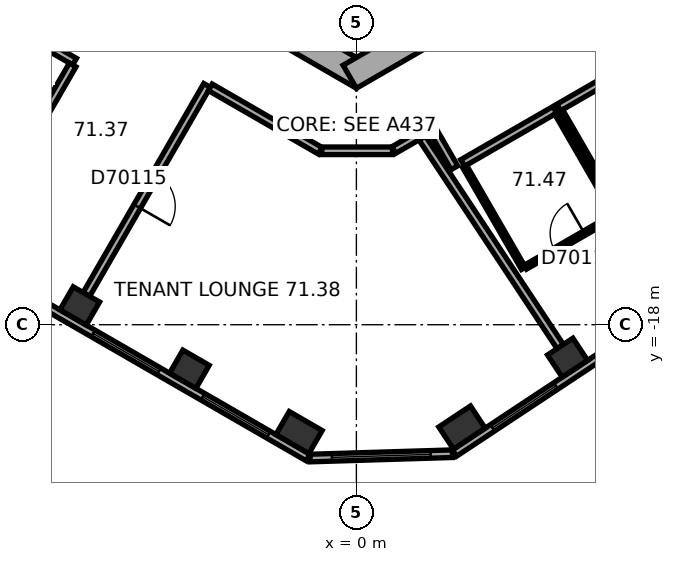
"""IFC4 building model, lengths in metres.
Left out: names, types, materials, properties, quantities, classifications, styles, units other than length and angle.
Written with IfcOpenShell. Run it as: python <this file> out.ifc"""

import sys

from ifc_helpers import new_model, si_unit, direction, frame, frame_2d, origin, origin_2d, place, context, subcontext, project, spatial, rectangle, extrude, element, fill, save


model = new_model("IFC4")
c1 = context("Model", 3, precision=1e-05, world=origin(), true_north=direction((0.0, 1.0)))
c2 = subcontext(c1, "Body", "Model", "MODEL_VIEW")
j1 = project(units=[si_unit("LENGTHUNIT", "METRE"), si_unit("PLANEANGLEUNIT", "RADIAN")], contexts=[c1])
p1 = place(None, origin())
s1 = spatial("IfcSite", under=j1, at=p1, CompositionType="ELEMENT")
p2 = place(p1, origin())
s2 = spatial("IfcBuilding", under=s1, at=p2, CompositionType="ELEMENT")
p3 = place(p2, frame((0.0, 0.0, 289.4)))
s3 = spatial("IfcBuildingStorey", under=s2, at=p3, CompositionType="ELEMENT", Elevation=289.4)
for number, where, z_axis, x_axis in (
    (1, (-7.28, -17.505, 0.0), (0.0, 0.0, 1.0), (0.866, -0.5, 0.0)),
    (2, (-4.395, -19.171, 0.0), (0.0, 0.0, 1.0), (0.866, -0.5, 0.0)),
):
    element("IfcColumn", number, at=place(p3, frame(where, z_axis=z_axis, x_axis=x_axis)), inside=s3, PredefinedType="COLUMN", context=c2, shape_type="SweptSolid", body=[
        extrude(rectangle(XDim=0.8, YDim=0.7, at=origin_2d()), origin(), (0.0, 0.0, 1.0), 3.7),
    ])
for number, where, z_axis, x_axis in (
    (3, (-1.509, -20.837, 0.0), (0.0, 0.0, 1.0), (0.866, -0.5, 0.0)),
    (4, (2.778, -20.706, 0.0), (0.0, 0.0, 1.0), (0.834, 0.552, 0.0)),
):
    element("IfcColumn", number, at=place(p3, frame(where, z_axis=z_axis, x_axis=x_axis)), inside=s3, PredefinedType="COLUMN", context=c2, shape_type="SweptSolid", body=[
        extrude(rectangle(XDim=1.0, YDim=0.7, at=origin_2d()), origin(), (0.0, 0.0, 1.0), 3.7),
    ])
p4 = place(p3, frame((5.557, -18.867, 0.0), z_axis=(0.0, 0.0, 1.0), x_axis=(0.833885822067, 0.551936985312, 0.0)))
e5 = element("IfcColumn", 5, at=p4, inside=s3, PredefinedType="COLUMN", context=c2, shape_type="SweptSolid", body=[
    extrude(rectangle(XDim=0.8, YDim=0.7, at=origin_2d()), origin(), (0.0, 0.0, 1.0), 3.7),
])
p5 = place(p3, frame((-10.025, -5.586, 0.0), z_axis=(0.0, 0.0, 1.0), x_axis=(0.866026453023, -0.499998182661, 0.0)))
e6 = element("IfcWall", 6, at=p5, inside=s3, PredefinedType="SHEAR", context=c2, shape_type="SweptSolid", body=[
    extrude(rectangle(XDim=11.778, YDim=0.7, at=frame_2d((5.889, 0.0))), origin(), (0.0, 0.0, 1.0), 3.7),
])
p6 = place(p5, frame((6.089, 0.0, 0.0)))
e7 = element("IfcOpeningElement", 7, at=p6, cuts=e6, PredefinedType="OPENING", context=c2, shape_type="SweptSolid", body=[
    extrude(rectangle(XDim=1.5, YDim=2.1, at=frame_2d((0.75, 1.05))), frame((0.0, 0.36, 0.0), z_axis=(0.0, -1.0, 0.0), x_axis=(1.0, 0.0, 0.0)), (0.0, 0.0, 1.0), 0.72),
])
p7 = place(p5, frame((1.539, 0.0, 0.0)))
e8 = element("IfcOpeningElement", 8, at=p7, cuts=e6, PredefinedType="OPENING", context=c2, shape_type="SweptSolid", body=[
    extrude(rectangle(XDim=1.1, YDim=2.1, at=frame_2d((0.55, 1.05))), frame((0.0, 0.36, 0.0), z_axis=(0.0, -1.0, 0.0), x_axis=(1.0, 0.0, 0.0)), (0.0, 0.0, 1.0), 0.72),
])
p8 = place(p5, frame((4.139, 0.0, 0.0)))
e9 = element("IfcOpeningElement", 9, at=p8, cuts=e6, PredefinedType="OPENING", context=c2, shape_type="SweptSolid", body=[
    extrude(rectangle(XDim=1.1, YDim=2.1, at=frame_2d((0.55, 1.05))), frame((0.0, 0.36, 0.0), z_axis=(0.0, -1.0, 0.0), x_axis=(1.0, 0.0, 0.0)), (0.0, 0.0, 1.0), 0.72),
])
p9 = place(p3, frame((-0.175, -11.475, 0.0), z_axis=(0.0, 0.0, 1.0), x_axis=(0.866026453023, 0.499998182661, 0.0)))
e10 = element("IfcWall", 10, at=p9, inside=s3, PredefinedType="SHEAR", context=c2, shape_type="SweptSolid", body=[
    extrude(rectangle(XDim=11.778, YDim=0.7, at=frame_2d((5.889, 0.0))), origin(), (0.0, 0.0, 1.0), 3.7),
])
p10 = place(p9, frame((2.439, 0.0, 0.0)))
e11 = element("IfcOpeningElement", 11, at=p10, cuts=e10, PredefinedType="OPENING", context=c2, shape_type="SweptSolid", body=[
    extrude(rectangle(XDim=1.1, YDim=2.1, at=frame_2d((0.55, 1.05))), frame((0.0, 0.36, 0.0), z_axis=(0.0, -1.0, 0.0), x_axis=(1.0, 0.0, 0.0)), (0.0, 0.0, 1.0), 0.72),
])
p11 = place(p9, frame((5.039, 0.0, 0.0)))
e12 = element("IfcOpeningElement", 12, at=p11, cuts=e10, PredefinedType="OPENING", context=c2, shape_type="SweptSolid", body=[
    extrude(rectangle(XDim=1.1, YDim=2.1, at=frame_2d((0.55, 1.05))), frame((0.0, 0.36, 0.0), z_axis=(0.0, -1.0, 0.0), x_axis=(1.0, 0.0, 0.0)), (0.0, 0.0, 1.0), 0.72),
])
p12 = place(p9, frame((7.639, 0.0, 0.0)))
e13 = element("IfcOpeningElement", 13, at=p12, cuts=e10, PredefinedType="OPENING", context=c2, shape_type="SweptSolid", body=[
    extrude(rectangle(XDim=1.1, YDim=2.1, at=frame_2d((0.55, 1.05))), frame((0.0, 0.36, 0.0), z_axis=(0.0, -1.0, 0.0), x_axis=(1.0, 0.0, 0.0)), (0.0, 0.0, 1.0), 0.72),
])
p13 = place(p3, frame((-16.626, -12.629, 0.0), z_axis=(0.0, 0.0, 1.0), x_axis=(0.866026460444, -0.499998169808, 0.0)))
e14 = element("IfcWall", 14, at=p13, inside=s3, PredefinedType="STANDARD", context=c2, shape_type="SweptSolid", body=[
    extrude(rectangle(XDim=17.731, YDim=0.2, at=frame_2d((8.866, 0.0))), origin(), (0.0, 0.0, 1.0), 3.7),
])
p14 = place(p13, frame((1.203, 0.0, 0.9)))
e15 = element("IfcOpeningElement", 15, at=p14, cuts=e14, PredefinedType="OPENING", context=c2, shape_type="SweptSolid", body=[
    extrude(rectangle(XDim=2.0, YDim=2.0, at=frame_2d((1.0, 1.0))), frame((0.0, 0.11, 0.0), z_axis=(0.0, -1.0, 0.0), x_axis=(1.0, 0.0, 0.0)), (0.0, 0.0, 1.0), 0.22),
])
p15 = place(p13, frame((4.535, 0.0, 0.9)))
e16 = element("IfcOpeningElement", 16, at=p15, cuts=e14, PredefinedType="OPENING", context=c2, shape_type="SweptSolid", body=[
    extrude(rectangle(XDim=2.0, YDim=2.0, at=frame_2d((1.0, 1.0))), frame((0.0, 0.11, 0.0), z_axis=(0.0, -1.0, 0.0), x_axis=(1.0, 0.0, 0.0)), (0.0, 0.0, 1.0), 0.22),
])
p16 = place(p13, frame((7.867, 0.0, 0.9)))
e17 = element("IfcOpeningElement", 17, at=p16, cuts=e14, PredefinedType="OPENING", context=c2, shape_type="SweptSolid", body=[
    extrude(rectangle(XDim=2.0, YDim=2.0, at=frame_2d((1.0, 1.0))), frame((0.0, 0.11, 0.0), z_axis=(0.0, -1.0, 0.0), x_axis=(1.0, 0.0, 0.0)), (0.0, 0.0, 1.0), 0.22),
])
p17 = place(p13, frame((11.198, 0.0, 0.9)))
e18 = element("IfcOpeningElement", 18, at=p17, cuts=e14, PredefinedType="OPENING", context=c2, shape_type="SweptSolid", body=[
    extrude(rectangle(XDim=2.0, YDim=2.0, at=frame_2d((1.0, 1.0))), frame((0.0, 0.11, 0.0), z_axis=(0.0, -1.0, 0.0), x_axis=(1.0, 0.0, 0.0)), (0.0, 0.0, 1.0), 0.22),
])
p18 = place(p13, frame((14.53, 0.0, 0.9)))
e19 = element("IfcOpeningElement", 19, at=p18, cuts=e14, PredefinedType="OPENING", context=c2, shape_type="SweptSolid", body=[
    extrude(rectangle(XDim=2.0, YDim=2.0, at=frame_2d((1.0, 1.0))), frame((0.0, 0.11, 0.0), z_axis=(0.0, -1.0, 0.0), x_axis=(1.0, 0.0, 0.0)), (0.0, 0.0, 1.0), 0.22),
])
p19 = place(p3, frame((-1.217, -21.508, 0.0), z_axis=(0.0, 0.0, 1.0), x_axis=(0.99953295295, 0.030559384285, 0.0)))
e20 = element("IfcWall", 20, at=p19, inside=s3, PredefinedType="STANDARD", context=c2, shape_type="SweptSolid", body=[
    extrude(rectangle(XDim=3.747, YDim=0.2, at=frame_2d((1.874, 0.0))), origin(), (0.0, 0.0, 1.0), 3.7),
])
p20 = place(p19, frame((0.573, 0.0, 0.9)))
e21 = element("IfcOpeningElement", 21, at=p20, cuts=e20, PredefinedType="OPENING", context=c2, shape_type="SweptSolid", body=[
    extrude(rectangle(XDim=2.6, YDim=2.0, at=frame_2d((1.3, 1.0))), frame((0.0, 0.11, 0.0), z_axis=(0.0, -1.0, 0.0), x_axis=(1.0, 0.0, 0.0)), (0.0, 0.0, 1.0), 0.22),
])
p21 = place(p3, frame((2.58, -21.377, 0.0), z_axis=(0.0, 0.0, 1.0), x_axis=(0.833888592176, 0.551932800112, 0.0)))
e22 = element("IfcWall", 22, at=p21, inside=s3, PredefinedType="STANDARD", context=c2, shape_type="SweptSolid", body=[
    extrude(rectangle(XDim=17.731, YDim=0.2, at=frame_2d((8.866, 0.0))), origin(), (0.0, 0.0, 1.0), 3.7),
])
p22 = place(p21, frame((1.202, 0.0, 0.9)))
e23 = element("IfcOpeningElement", 23, at=p22, cuts=e22, PredefinedType="OPENING", context=c2, shape_type="SweptSolid", body=[
    extrude(rectangle(XDim=2.0, YDim=2.0, at=frame_2d((1.0, 1.0))), frame((0.0, 0.11, 0.0), z_axis=(0.0, -1.0, 0.0), x_axis=(1.0, 0.0, 0.0)), (0.0, 0.0, 1.0), 0.22),
])
p23 = place(p21, frame((4.533, 0.0, 0.9)))
e24 = element("IfcOpeningElement", 24, at=p23, cuts=e22, PredefinedType="OPENING", context=c2, shape_type="SweptSolid", body=[
    extrude(rectangle(XDim=2.0, YDim=2.0, at=frame_2d((1.0, 1.0))), frame((0.0, 0.11, 0.0), z_axis=(0.0, -1.0, 0.0), x_axis=(1.0, 0.0, 0.0)), (0.0, 0.0, 1.0), 0.22),
])
p24 = place(p21, frame((7.865, 0.0, 0.9)))
e25 = element("IfcOpeningElement", 25, at=p24, cuts=e22, PredefinedType="OPENING", context=c2, shape_type="SweptSolid", body=[
    extrude(rectangle(XDim=2.0, YDim=2.0, at=frame_2d((1.0, 1.0))), frame((0.0, 0.11, 0.0), z_axis=(0.0, -1.0, 0.0), x_axis=(1.0, 0.0, 0.0)), (0.0, 0.0, 1.0), 0.22),
])
p25 = place(p21, frame((11.197, 0.0, 0.9)))
e26 = element("IfcOpeningElement", 26, at=p25, cuts=e22, PredefinedType="OPENING", context=c2, shape_type="SweptSolid", body=[
    extrude(rectangle(XDim=2.0, YDim=2.0, at=frame_2d((1.0, 1.0))), frame((0.0, 0.11, 0.0), z_axis=(0.0, -1.0, 0.0), x_axis=(1.0, 0.0, 0.0)), (0.0, 0.0, 1.0), 0.22),
])
p26 = place(p21, frame((14.528, 0.0, 0.9)))
e27 = element("IfcOpeningElement", 27, at=p26, cuts=e22, PredefinedType="OPENING", context=c2, shape_type="SweptSolid", body=[
    extrude(rectangle(XDim=2.0, YDim=2.0, at=frame_2d((1.0, 1.0))), frame((0.0, 0.11, 0.0), z_axis=(0.0, -1.0, 0.0), x_axis=(1.0, 0.0, 0.0)), (0.0, 0.0, 1.0), 0.22),
])
p27 = place(p3, frame((-11.285, -8.844, 0.0), z_axis=(0.0, 0.0, 1.0), x_axis=(0.866021785011, -0.500006267848, 0.0)))
e28 = element("IfcWall", 28, at=p27, inside=s3, PredefinedType="PARTITIONING", context=c2, shape_type="SweptSolid", body=[
    extrude(rectangle(XDim=4.468, YDim=0.2, at=frame_2d((2.234, 0.0))), origin(), (0.0, 0.0, 1.0), 3.42),
])
p28 = place(p3, frame((-9.99, -15.537, 0.0), z_axis=(0.0, 0.0, 1.0), x_axis=(0.499966611936, 0.866044679534, 0.0)))
e29 = element("IfcWall", 29, at=p28, inside=s3, PredefinedType="PARTITIONING", context=c2, shape_type="SweptSolid", body=[
    extrude(rectangle(XDim=5.049, YDim=0.2, at=frame_2d((2.524, 0.0))), origin(), (0.0, 0.0, 1.0), 2.87),
])
p29 = place(p28, frame((2.024, 0.0, 0.0)))
e30 = element("IfcOpeningElement", 30, at=p29, cuts=e29, PredefinedType="OPENING", context=c2, shape_type="SweptSolid", body=[
    extrude(rectangle(XDim=1.0, YDim=2.1, at=frame_2d((0.5, 1.05))), frame((0.0, 0.11, 0.0), z_axis=(0.0, -1.0, 0.0), x_axis=(1.0, 0.0, 0.0)), (0.0, 0.0, 1.0), 0.22),
])
p30 = place(p3, frame((-7.105, -17.202, 0.0), z_axis=(0.0, 0.0, 1.0), x_axis=(0.499988692146, 0.866031932279, 0.0)))
e31 = element("IfcWall", 31, at=p30, inside=s3, PredefinedType="PARTITIONING", context=c2, shape_type="SweptSolid", body=[
    extrude(rectangle(XDim=6.35, YDim=0.2, at=frame_2d((3.175, 0.0))), origin(), (0.0, 0.0, 1.0), 3.42),
])
p31 = place(p30, frame((2.675, 0.0, 0.0)))
e32 = element("IfcOpeningElement", 32, at=p31, cuts=e31, PredefinedType="OPENING", context=c2, shape_type="SweptSolid", body=[
    extrude(rectangle(XDim=1.0, YDim=2.1, at=frame_2d((0.5, 1.05))), frame((0.0, 0.11, 0.0), z_axis=(0.0, -1.0, 0.0), x_axis=(1.0, 0.0, 0.0)), (0.0, 0.0, 1.0), 0.22),
])
p32 = place(p3, frame((-3.843, -11.753, 0.0), z_axis=(0.0, 0.0, 1.0), x_axis=(0.866031037473, -0.499990242038, 0.0)))
e33 = element("IfcWall", 33, at=p32, inside=s3, PredefinedType="PARTITIONING", context=c2, shape_type="SweptSolid", body=[
    extrude(rectangle(XDim=3.341, YDim=0.2, at=frame_2d((1.67, 0.0))), origin(), (0.0, 0.0, 1.0), 3.42),
])
p33 = place(p3, frame((-0.91, -13.423, 0.0), z_axis=(0.0, 0.0, 1.0), x_axis=(1.0, 0.0, 0.0)))
e34 = element("IfcWall", 34, at=p33, inside=s3, PredefinedType="PARTITIONING", context=c2, shape_type="SweptSolid", body=[
    extrude(rectangle(XDim=1.86, YDim=0.2, at=frame_2d((0.93, 0.0))), origin(), (0.0, 0.0, 1.0), 3.42),
])
p34 = place(p3, frame((0.985, -13.403, 0.0), z_axis=(0.0, 0.0, 1.0), x_axis=(0.866032814021, 0.499987164874, 0.0)))
e35 = element("IfcWall", 35, at=p34, inside=s3, PredefinedType="PARTITIONING", context=c2, shape_type="SweptSolid", body=[
    extrude(rectangle(XDim=0.798, YDim=0.2, at=frame_2d((0.399, 0.0))), origin(), (0.0, 0.0, 1.0), 3.42),
])
p35 = place(p3, frame((1.979, -12.829, 0.0), z_axis=(0.0, 0.0, 1.0), x_axis=(0.500074377092, -0.865982457891, 0.0)))
e36 = element("IfcWall", 36, at=p35, inside=s3, PredefinedType="PARTITIONING", context=c2, shape_type="SweptSolid", body=[
    extrude(rectangle(XDim=1.201, YDim=0.2, at=frame_2d((0.601, 0.0))), origin(), (0.0, 0.0, 1.0), 3.42),
])
p36 = place(p3, frame((2.796, -13.744, 0.0), z_axis=(0.0, 0.0, 1.0), x_axis=(0.866034573852, 0.49998411664, 0.0)))
e37 = element("IfcWall", 37, at=p36, inside=s3, PredefinedType="PARTITIONING", context=c2, shape_type="SweptSolid", body=[
    extrude(rectangle(XDim=2.8, YDim=0.2, at=frame_2d((1.4, 0.0))), origin(), (0.0, 0.0, 1.0), 3.42),
])
p37 = place(p3, frame((4.396, -16.516, 0.0), z_axis=(0.0, 0.0, 1.0), x_axis=(-0.49999285859, 0.86602952684, 0.0)))
e38 = element("IfcWall", 38, at=p37, inside=s3, PredefinedType="PARTITIONING", context=c2, shape_type="SweptSolid", body=[
    extrude(rectangle(XDim=3.1, YDim=0.12, at=frame_2d((1.55, 0.0))), origin(), (0.0, 0.0, 1.0), 3.42),
])
p38 = place(p3, frame((5.271, -12.431, 0.0), z_axis=(0.0, 0.0, 1.0), x_axis=(0.500026960575, -0.86600983753, 0.0)))
e39 = element("IfcWall", 39, at=p38, inside=s3, PredefinedType="PARTITIONING", context=c2, shape_type="SweptSolid", body=[
    extrude(rectangle(XDim=3.1, YDim=0.12, at=frame_2d((1.55, 0.0))), origin(), (0.0, 0.0, 1.0), 3.42),
])
p39 = place(p3, frame((5.325, -12.284, 0.0), z_axis=(0.0, 0.0, 1.0), x_axis=(0.866034573852, 0.49998411664, 0.0)))
e40 = element("IfcWall", 40, at=p39, inside=s3, PredefinedType="PARTITIONING", context=c2, shape_type="SweptSolid", body=[
    extrude(rectangle(XDim=2.8, YDim=0.2, at=frame_2d((1.4, 0.0))), origin(), (0.0, 0.0, 1.0), 3.42),
])
p40 = place(p3, frame((5.364, -18.575, 0.0), z_axis=(0.0, 0.0, 1.0), x_axis=(-0.55195757761, 0.833872191957, 0.0)))
e41 = element("IfcWall", 41, at=p40, inside=s3, PredefinedType="PARTITIONING", context=c2, shape_type="SweptSolid", body=[
    extrude(rectangle(XDim=6.581, YDim=0.2, at=frame_2d((3.291, 0.0))), origin(), (0.0, 0.0, 1.0), 3.42),
])
p41 = place(p3, frame((6.769, -15.146, 0.0), z_axis=(0.0, 0.0, 1.0), x_axis=(-0.866020236886, -0.500008949224, 0.0)))
e42 = element("IfcWall", 42, at=p41, inside=s3, PredefinedType="PARTITIONING", context=c2, shape_type="SweptSolid", body=[
    extrude(rectangle(XDim=2.68, YDim=0.12, at=frame_2d((1.34, 0.0))), origin(), (0.0, 0.0, 1.0), 3.42),
])
p42 = place(p41, frame((0.89, 0.0, 0.0)))
e43 = element("IfcOpeningElement", 43, at=p42, cuts=e42, PredefinedType="OPENING", context=c2, shape_type="SweptSolid", body=[
    extrude(rectangle(XDim=0.9, YDim=2.1, at=frame_2d((0.45, 1.05))), frame((0.0, 0.07, 0.0), z_axis=(0.0, -1.0, 0.0), x_axis=(1.0, 0.0, 0.0)), (0.0, 0.0, 1.0), 0.14),
])
p43 = place(p3, frame((6.925, -15.056, 0.0), z_axis=(0.0, 0.0, 1.0), x_axis=(-0.49999285859, 0.86602952684, 0.0)))
e44 = element("IfcWall", 44, at=p43, inside=s3, PredefinedType="PARTITIONING", context=c2, shape_type="SweptSolid", body=[
    extrude(rectangle(XDim=3.1, YDim=0.12, at=frame_2d((1.55, 0.0))), origin(), (0.0, 0.0, 1.0), 2.87),
])
p44 = place(p17, origin())
e45 = element("IfcWindow", 45, at=p44, inside=s3, PartitioningType="SINGLE_PANEL", PredefinedType="WINDOW", context=c2, shape_type="SweptSolid", body=[
    extrude(rectangle(XDim=2.0, YDim=2.0, at=frame_2d((1.0, 1.0))), frame((0.0, 0.03, 0.0), z_axis=(0.0, -1.0, 0.0), x_axis=(1.0, 0.0, 0.0)), (0.0, 0.0, 1.0), 0.06),
])
fill(e18, e45)
p45 = place(p18, origin())
e46 = element("IfcWindow", 46, at=p45, inside=s3, PartitioningType="SINGLE_PANEL", PredefinedType="WINDOW", context=c2, shape_type="SweptSolid", body=[
    extrude(rectangle(XDim=2.0, YDim=2.0, at=frame_2d((1.0, 1.0))), frame((0.0, 0.03, 0.0), z_axis=(0.0, -1.0, 0.0), x_axis=(1.0, 0.0, 0.0)), (0.0, 0.0, 1.0), 0.06),
])
fill(e19, e46)
p46 = place(p20, origin())
e47 = element("IfcWindow", 47, at=p46, inside=s3, PartitioningType="SINGLE_PANEL", PredefinedType="WINDOW", context=c2, shape_type="SweptSolid", body=[
    extrude(rectangle(XDim=2.6, YDim=2.0, at=frame_2d((1.3, 1.0))), frame((0.0, 0.03, 0.0), z_axis=(0.0, -1.0, 0.0), x_axis=(1.0, 0.0, 0.0)), (0.0, 0.0, 1.0), 0.06),
])
fill(e21, e47)
p47 = place(p22, origin())
e48 = element("IfcWindow", 48, at=p47, inside=s3, PartitioningType="SINGLE_PANEL", PredefinedType="WINDOW", context=c2, shape_type="SweptSolid", body=[
    extrude(rectangle(XDim=2.0, YDim=2.0, at=frame_2d((1.0, 1.0))), frame((0.0, 0.03, 0.0), z_axis=(0.0, -1.0, 0.0), x_axis=(1.0, 0.0, 0.0)), (0.0, 0.0, 1.0), 0.06),
])
fill(e23, e48)
p48 = place(p31, origin())
e49 = element("IfcDoor", 49, at=p48, inside=s3, OperationType="SINGLE_SWING_LEFT", PredefinedType="DOOR", context=c2, shape_type="SweptSolid", body=[
    extrude(rectangle(XDim=1.0, YDim=2.1, at=frame_2d((0.5, 1.05))), frame((0.0, 0.025, 0.0), z_axis=(0.0, -1.0, 0.0), x_axis=(1.0, 0.0, 0.0)), (0.0, 0.0, 1.0), 0.05),
])
fill(e32, e49)
p49 = place(p42, origin())
e50 = element("IfcDoor", 50, at=p49, inside=s3, OperationType="SINGLE_SWING_LEFT", PredefinedType="DOOR", context=c2, shape_type="SweptSolid", body=[
    extrude(rectangle(XDim=0.9, YDim=2.1, at=frame_2d((0.45, 1.05))), frame((0.0, 0.025, 0.0), z_axis=(0.0, -1.0, 0.0), x_axis=(1.0, 0.0, 0.0)), (0.0, 0.0, 1.0), 0.05),
])
fill(e43, e50)
save(model, sys.argv[1])
